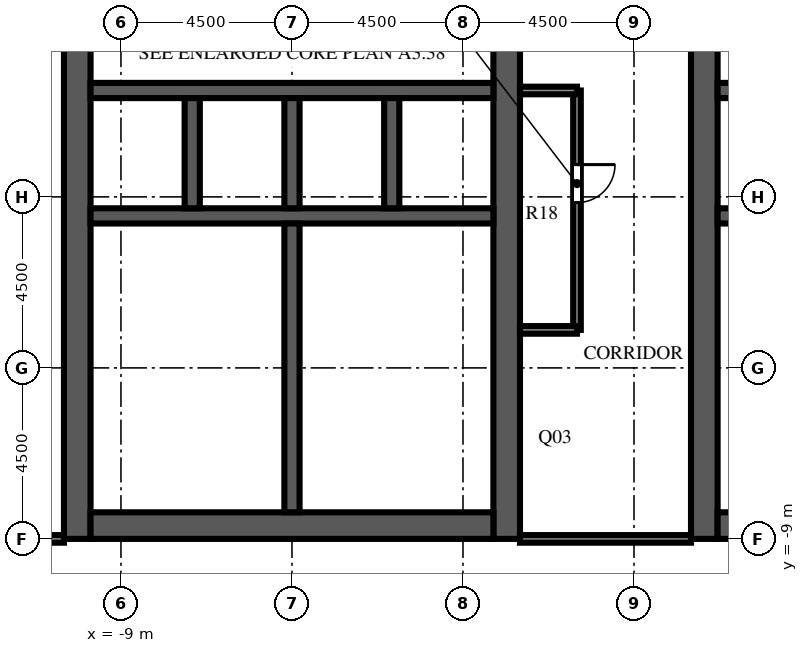
"""IFC4 building model, lengths in metres.
Left out: names, types, materials, properties, quantities, classifications, styles, units other than length and angle.
Written with IfcOpenShell. Run it as: python <this file> out.ifc"""

import sys

from ifc_helpers import new_model, si_unit, direction, frame, frame_2d, origin, place, context, subcontext, project, spatial, rectangle, extrude, element, fill, save


model = new_model("IFC4")
c1 = context("Model", 3, precision=1e-05, world=origin(), true_north=direction((0.0, 1.0)))
c2 = subcontext(c1, "Body", "Model", "MODEL_VIEW")
j1 = project(units=[si_unit("LENGTHUNIT", "METRE"), si_unit("PLANEANGLEUNIT", "RADIAN")], contexts=[c1])
p1 = place(None, origin())
s1 = spatial("IfcSite", under=j1, at=p1, CompositionType="ELEMENT")
p2 = place(p1, origin())
s2 = spatial("IfcBuilding", under=s1, at=p2, CompositionType="ELEMENT")
p3 = place(p2, frame((0.0, 0.0, 260.3)))
s3 = spatial("IfcBuildingStorey", under=s2, at=p3, CompositionType="ELEMENT", Elevation=260.3)
p4 = place(p3, frame((-10.15, -9.0, 0.0), z_axis=(0.0, 0.0, 1.0), x_axis=(0.0, 1.0, 0.0)))
e1 = element("IfcWall", 1, at=p4, inside=s3, PredefinedType="SHEAR", context=c2, shape_type="SweptSolid", body=[
    extrude(rectangle(XDim=27.5, YDim=0.7, at=frame_2d((13.75, 0.0))), origin(), (0.0, 0.0, 1.0), 6.0),
])
p5 = place(p4, frame((12.55, 0.0, 0.0)))
e2 = element("IfcOpeningElement", 2, at=p5, cuts=e1, PredefinedType="OPENING", context=c2, shape_type="SweptSolid", body=[
    extrude(rectangle(XDim=2.4, YDim=2.4, at=frame_2d((1.2, 1.2))), frame((0.0, 0.36, 0.0), z_axis=(0.0, -1.0, 0.0), x_axis=(1.0, 0.0, 0.0)), (0.0, 0.0, 1.0), 0.72),
])
p6 = place(p4, frame((6.825, 0.0, 0.0)))
e3 = element("IfcOpeningElement", 3, at=p6, cuts=e1, PredefinedType="OPENING", context=c2, shape_type="SweptSolid", body=[
    extrude(rectangle(XDim=1.2, YDim=2.1, at=frame_2d((0.6, 1.05))), frame((0.0, 0.36, 0.0), z_axis=(0.0, -1.0, 0.0), x_axis=(1.0, 0.0, 0.0)), (0.0, 0.0, 1.0), 0.72),
])
p7 = place(p4, frame((19.475, 0.0, 0.0)))
e4 = element("IfcOpeningElement", 4, at=p7, cuts=e1, PredefinedType="OPENING", context=c2, shape_type="SweptSolid", body=[
    extrude(rectangle(XDim=1.2, YDim=2.1, at=frame_2d((0.6, 1.05))), frame((0.0, 0.36, 0.0), z_axis=(0.0, -1.0, 0.0), x_axis=(1.0, 0.0, 0.0)), (0.0, 0.0, 1.0), 0.72),
])
p8 = place(p3, frame((1.15, -9.0, 0.0), z_axis=(0.0, 0.0, 1.0), x_axis=(0.0, 1.0, 0.0)))
e5 = element("IfcWall", 5, at=p8, inside=s3, PredefinedType="SHEAR", context=c2, shape_type="SweptSolid", body=[
    extrude(rectangle(XDim=27.5, YDim=0.7, at=frame_2d((13.75, 0.0))), origin(), (0.0, 0.0, 1.0), 6.0),
])
p9 = place(p8, frame((12.55, 0.0, 0.0)))
e6 = element("IfcOpeningElement", 6, at=p9, cuts=e5, PredefinedType="OPENING", context=c2, shape_type="SweptSolid", body=[
    extrude(rectangle(XDim=2.4, YDim=2.4, at=frame_2d((1.2, 1.2))), frame((0.0, 0.36, 0.0), z_axis=(0.0, -1.0, 0.0), x_axis=(1.0, 0.0, 0.0)), (0.0, 0.0, 1.0), 0.72),
])
p10 = place(p8, frame((3.788, 0.0, 0.0)))
e7 = element("IfcOpeningElement", 7, at=p10, cuts=e5, PredefinedType="OPENING", context=c2, shape_type="SweptSolid", body=[
    extrude(rectangle(XDim=0.968, YDim=2.1, at=frame_2d((0.484, 1.05))), frame((0.0, 0.36, 0.0), z_axis=(0.0, -1.0, 0.0), x_axis=(1.0, 0.0, 0.0)), (0.0, 0.0, 1.0), 0.72),
])
p11 = place(p8, frame((23.54, 0.0, 0.0)))
e8 = element("IfcOpeningElement", 8, at=p11, cuts=e5, PredefinedType="OPENING", context=c2, shape_type="SweptSolid", body=[
    extrude(rectangle(XDim=1.2, YDim=2.1, at=frame_2d((0.6, 1.05))), frame((0.0, 0.36, 0.0), z_axis=(0.0, -1.0, 0.0), x_axis=(1.0, 0.0, 0.0)), (0.0, 0.0, 1.0), 0.72),
])
p12 = place(p3, frame((-9.8, -8.65, 0.0), z_axis=(0.0, 0.0, 1.0), x_axis=(1.0, 0.0, 0.0)))
e9 = element("IfcWall", 9, at=p12, inside=s3, PredefinedType="SHEAR", context=c2, shape_type="SweptSolid", body=[
    extrude(rectangle(XDim=10.6, YDim=0.7, at=frame_2d((5.3, 0.0))), origin(), (0.0, 0.0, 1.0), 6.0),
])
p13 = place(p3, frame((-9.8, -0.5, 0.0), z_axis=(0.0, 0.0, 1.0), x_axis=(1.0, 0.0, 0.0)))
e10 = element("IfcWall", 10, at=p13, inside=s3, PredefinedType="SHEAR", context=c2, shape_type="SweptSolid", body=[
    extrude(rectangle(XDim=10.6, YDim=0.4, at=frame_2d((5.3, 0.0))), origin(), (0.0, 0.0, 1.0), 6.0),
])
p14 = place(p3, frame((-9.8, 2.8, 0.0), z_axis=(0.0, 0.0, 1.0), x_axis=(1.0, 0.0, 0.0)))
e11 = element("IfcWall", 11, at=p14, inside=s3, PredefinedType="SHEAR", context=c2, shape_type="SweptSolid", body=[
    extrude(rectangle(XDim=10.6, YDim=0.4, at=frame_2d((5.3, 0.0))), origin(), (0.0, 0.0, 1.0), 6.0),
])
p15 = place(p14, frame((0.688, 0.0, 0.0)))
e12 = element("IfcOpeningElement", 12, at=p15, cuts=e11, PredefinedType="OPENING", context=c2, shape_type="SweptSolid", body=[
    extrude(rectangle(XDim=1.1, YDim=2.1, at=frame_2d((0.55, 1.05))), frame((0.0, 0.21, 0.0), z_axis=(0.0, -1.0, 0.0), x_axis=(1.0, 0.0, 0.0)), (0.0, 0.0, 1.0), 0.42),
])
p16 = place(p14, frame((3.438, 0.0, 0.0)))
e13 = element("IfcOpeningElement", 13, at=p16, cuts=e11, PredefinedType="OPENING", context=c2, shape_type="SweptSolid", body=[
    extrude(rectangle(XDim=1.1, YDim=2.1, at=frame_2d((0.55, 1.05))), frame((0.0, 0.21, 0.0), z_axis=(0.0, -1.0, 0.0), x_axis=(1.0, 0.0, 0.0)), (0.0, 0.0, 1.0), 0.42),
])
p17 = place(p14, frame((6.113, 0.0, 0.0)))
e14 = element("IfcOpeningElement", 14, at=p17, cuts=e11, PredefinedType="OPENING", context=c2, shape_type="SweptSolid", body=[
    extrude(rectangle(XDim=1.0, YDim=2.1, at=frame_2d((0.5, 1.05))), frame((0.0, 0.21, 0.0), z_axis=(0.0, -1.0, 0.0), x_axis=(1.0, 0.0, 0.0)), (0.0, 0.0, 1.0), 0.42),
])
p18 = place(p14, frame((8.863, 0.0, 0.0)))
e15 = element("IfcOpeningElement", 15, at=p18, cuts=e11, PredefinedType="OPENING", context=c2, shape_type="SweptSolid", body=[
    extrude(rectangle(XDim=1.0, YDim=2.1, at=frame_2d((0.5, 1.05))), frame((0.0, 0.21, 0.0), z_axis=(0.0, -1.0, 0.0), x_axis=(1.0, 0.0, 0.0)), (0.0, 0.0, 1.0), 0.42),
])
for number, where, z_axis, x_axis in (
    (16, (-7.125, -0.3, 0.0), (0.0, 0.0, 1.0), (0.0, 1.0, 0.0)),
    (17, (-4.5, -0.3, 0.0), (0.0, 0.0, 1.0), (0.0, 1.0, 0.0)),
    (18, (-1.875, -0.3, 0.0), (0.0, 0.0, 1.0), (0.0, 1.0, 0.0)),
):
    element("IfcWall", number, at=place(p3, frame(where, z_axis=z_axis, x_axis=x_axis)), inside=s3, PredefinedType="SHEAR", context=c2, shape_type="SweptSolid", body=[
        extrude(rectangle(XDim=2.9, YDim=0.4, at=frame_2d((1.45, 0.0))), origin(), (0.0, 0.0, 1.0), 6.0),
    ])
p19 = place(p3, frame((-4.5, -8.3, 0.0), z_axis=(0.0, 0.0, 1.0), x_axis=(0.0, 1.0, 0.0)))
e19 = element("IfcWall", 19, at=p19, inside=s3, PredefinedType="SHEAR", context=c2, shape_type="SweptSolid", body=[
    extrude(rectangle(XDim=7.6, YDim=0.4, at=frame_2d((3.8, 0.0))), origin(), (0.0, 0.0, 1.0), 6.0),
])
p20 = place(p3, frame((6.35, -9.0, 0.0), z_axis=(0.0, 0.0, 1.0), x_axis=(0.0, 1.0, 0.0)))
e20 = element("IfcWall", 20, at=p20, inside=s3, PredefinedType="SHEAR", context=c2, shape_type="SweptSolid", body=[
    extrude(rectangle(XDim=27.5, YDim=0.7, at=frame_2d((13.75, 0.0))), origin(), (0.0, 0.0, 1.0), 6.0),
])
p21 = place(p20, frame((12.55, 0.0, 0.0)))
e21 = element("IfcOpeningElement", 21, at=p21, cuts=e20, PredefinedType="OPENING", context=c2, shape_type="SweptSolid", body=[
    extrude(rectangle(XDim=2.4, YDim=2.4, at=frame_2d((1.2, 1.2))), frame((0.0, 0.36, 0.0), z_axis=(0.0, -1.0, 0.0), x_axis=(1.0, 0.0, 0.0)), (0.0, 0.0, 1.0), 0.72),
])
p22 = place(p20, frame((3.788, 0.0, 0.0)))
e22 = element("IfcOpeningElement", 22, at=p22, cuts=e20, PredefinedType="OPENING", context=c2, shape_type="SweptSolid", body=[
    extrude(rectangle(XDim=0.968, YDim=2.1, at=frame_2d((0.484, 1.05))), frame((0.0, 0.36, 0.0), z_axis=(0.0, -1.0, 0.0), x_axis=(1.0, 0.0, 0.0)), (0.0, 0.0, 1.0), 0.72),
])
p23 = place(p20, frame((23.54, 0.0, 0.0)))
e23 = element("IfcOpeningElement", 23, at=p23, cuts=e20, PredefinedType="OPENING", context=c2, shape_type="SweptSolid", body=[
    extrude(rectangle(XDim=1.2, YDim=2.1, at=frame_2d((0.6, 1.05))), frame((0.0, 0.36, 0.0), z_axis=(0.0, -1.0, 0.0), x_axis=(1.0, 0.0, 0.0)), (0.0, 0.0, 1.0), 0.72),
])
p24 = place(p3, frame((6.7, -8.65, 0.0), z_axis=(0.0, 0.0, 1.0), x_axis=(1.0, 0.0, 0.0)))
e24 = element("IfcWall", 24, at=p24, inside=s3, PredefinedType="SHEAR", context=c2, shape_type="SweptSolid", body=[
    extrude(rectangle(XDim=10.6, YDim=0.7, at=frame_2d((5.3, 0.0))), origin(), (0.0, 0.0, 1.0), 6.0),
])
p25 = place(p3, frame((6.7, -0.5, 0.0), z_axis=(0.0, 0.0, 1.0), x_axis=(1.0, 0.0, 0.0)))
e25 = element("IfcWall", 25, at=p25, inside=s3, PredefinedType="SHEAR", context=c2, shape_type="SweptSolid", body=[
    extrude(rectangle(XDim=10.6, YDim=0.4, at=frame_2d((5.3, 0.0))), origin(), (0.0, 0.0, 1.0), 6.0),
])
p26 = place(p3, frame((6.7, 2.8, 0.0), z_axis=(0.0, 0.0, 1.0), x_axis=(1.0, 0.0, 0.0)))
e26 = element("IfcWall", 26, at=p26, inside=s3, PredefinedType="SHEAR", context=c2, shape_type="SweptSolid", body=[
    extrude(rectangle(XDim=10.6, YDim=0.4, at=frame_2d((5.3, 0.0))), origin(), (0.0, 0.0, 1.0), 6.0),
])
p27 = place(p26, frame((0.688, 0.0, 0.0)))
e27 = element("IfcOpeningElement", 27, at=p27, cuts=e26, PredefinedType="OPENING", context=c2, shape_type="SweptSolid", body=[
    extrude(rectangle(XDim=1.1, YDim=2.1, at=frame_2d((0.55, 1.05))), frame((0.0, 0.21, 0.0), z_axis=(0.0, -1.0, 0.0), x_axis=(1.0, 0.0, 0.0)), (0.0, 0.0, 1.0), 0.42),
])
p28 = place(p26, frame((3.438, 0.0, 0.0)))
e28 = element("IfcOpeningElement", 28, at=p28, cuts=e26, PredefinedType="OPENING", context=c2, shape_type="SweptSolid", body=[
    extrude(rectangle(XDim=1.1, YDim=2.1, at=frame_2d((0.55, 1.05))), frame((0.0, 0.21, 0.0), z_axis=(0.0, -1.0, 0.0), x_axis=(1.0, 0.0, 0.0)), (0.0, 0.0, 1.0), 0.42),
])
p29 = place(p26, frame((6.113, 0.0, 0.0)))
e29 = element("IfcOpeningElement", 29, at=p29, cuts=e26, PredefinedType="OPENING", context=c2, shape_type="SweptSolid", body=[
    extrude(rectangle(XDim=1.0, YDim=2.1, at=frame_2d((0.5, 1.05))), frame((0.0, 0.21, 0.0), z_axis=(0.0, -1.0, 0.0), x_axis=(1.0, 0.0, 0.0)), (0.0, 0.0, 1.0), 0.42),
])
p30 = place(p26, frame((8.863, 0.0, 0.0)))
e30 = element("IfcOpeningElement", 30, at=p30, cuts=e26, PredefinedType="OPENING", context=c2, shape_type="SweptSolid", body=[
    extrude(rectangle(XDim=1.0, YDim=2.1, at=frame_2d((0.5, 1.05))), frame((0.0, 0.21, 0.0), z_axis=(0.0, -1.0, 0.0), x_axis=(1.0, 0.0, 0.0)), (0.0, 0.0, 1.0), 0.42),
])
p31 = place(p3, frame((-4.3, -5.412, 0.0), z_axis=(0.0, 0.0, 1.0), x_axis=(1.0, 0.0, 0.0)))
e31 = element("IfcWall", 31, at=p31, inside=s3, PredefinedType="PARTITIONING", context=c2, shape_type="SweptSolid", body=[
    extrude(rectangle(XDim=5.1, YDim=0.1, at=frame_2d((2.55, 0.0))), origin(), (0.0, 0.0, 1.0), 5.55),
])
p32 = place(p31, frame((2.05, 0.0, 0.0)))
e32 = element("IfcOpeningElement", 32, at=p32, cuts=e31, PredefinedType="OPENING", context=c2, shape_type="SweptSolid", body=[
    extrude(rectangle(XDim=1.0, YDim=2.1, at=frame_2d((0.5, 1.05))), frame((0.0, 0.06, 0.0), z_axis=(0.0, -1.0, 0.0), x_axis=(1.0, 0.0, 0.0)), (0.0, 0.0, 1.0), 0.12),
])
p33 = place(p3, frame((-2.362, -4.044, 0.0), z_axis=(0.0, 0.0, 1.0), x_axis=(1.0, 0.0, 0.0)))
e33 = element("IfcWall", 33, at=p33, inside=s3, PredefinedType="PARTITIONING", context=c2, shape_type="SweptSolid", body=[
    extrude(rectangle(XDim=3.162, YDim=0.1, at=frame_2d((1.581, 0.0))), origin(), (0.0, 0.0, 1.0), 5.55),
])
p34 = place(p33, frame((1.081, 0.0, 0.0)))
e34 = element("IfcOpeningElement", 34, at=p34, cuts=e33, PredefinedType="OPENING", context=c2, shape_type="SweptSolid", body=[
    extrude(rectangle(XDim=1.0, YDim=2.1, at=frame_2d((0.5, 1.05))), frame((0.0, 0.06, 0.0), z_axis=(0.0, -1.0, 0.0), x_axis=(1.0, 0.0, 0.0)), (0.0, 0.0, 1.0), 0.12),
])
p35 = place(p3, frame((-4.3, -4.044, 0.0), z_axis=(0.0, 0.0, 1.0), x_axis=(1.0, 0.0, 0.0)))
e35 = element("IfcWall", 35, at=p35, inside=s3, PredefinedType="PARTITIONING", context=c2, shape_type="SweptSolid", body=[
    extrude(rectangle(XDim=1.938, YDim=0.1, at=frame_2d((0.969, 0.0))), origin(), (0.0, 0.0, 1.0), 5.55),
])
p36 = place(p35, frame((0.469, 0.0, 0.0)))
e36 = element("IfcOpeningElement", 36, at=p36, cuts=e35, PredefinedType="OPENING", context=c2, shape_type="SweptSolid", body=[
    extrude(rectangle(XDim=1.0, YDim=2.1, at=frame_2d((0.5, 1.05))), frame((0.0, 0.06, 0.0), z_axis=(0.0, -1.0, 0.0), x_axis=(1.0, 0.0, 0.0)), (0.0, 0.0, 1.0), 0.12),
])
p37 = place(p3, frame((-2.362, -4.044, 0.0), z_axis=(0.0, 0.0, 1.0), x_axis=(0.0, 1.0, 0.0)))
e37 = element("IfcWall", 37, at=p37, inside=s3, PredefinedType="PARTITIONING", context=c2, shape_type="SweptSolid", body=[
    extrude(rectangle(XDim=3.344, YDim=0.1, at=frame_2d((1.672, 0.0))), origin(), (0.0, 0.0, 1.0), 5.55),
])
p38 = place(p3, frame((6.7, -5.412, 0.0), z_axis=(0.0, 0.0, 1.0), x_axis=(1.0, 0.0, 0.0)))
e38 = element("IfcWall", 38, at=p38, inside=s3, PredefinedType="PARTITIONING", context=c2, shape_type="SweptSolid", body=[
    extrude(rectangle(XDim=5.1, YDim=0.1, at=frame_2d((2.55, 0.0))), origin(), (0.0, 0.0, 1.0), 5.55),
])
p39 = place(p38, frame((2.05, 0.0, 0.0)))
e39 = element("IfcOpeningElement", 39, at=p39, cuts=e38, PredefinedType="OPENING", context=c2, shape_type="SweptSolid", body=[
    extrude(rectangle(XDim=1.0, YDim=2.1, at=frame_2d((0.5, 1.05))), frame((0.0, 0.06, 0.0), z_axis=(0.0, -1.0, 0.0), x_axis=(1.0, 0.0, 0.0)), (0.0, 0.0, 1.0), 0.12),
])
p40 = place(p3, frame((6.7, -4.044, 0.0), z_axis=(0.0, 0.0, 1.0), x_axis=(1.0, 0.0, 0.0)))
e40 = element("IfcWall", 40, at=p40, inside=s3, PredefinedType="PARTITIONING", context=c2, shape_type="SweptSolid", body=[
    extrude(rectangle(XDim=3.162, YDim=0.1, at=frame_2d((1.581, 0.0))), origin(), (0.0, 0.0, 1.0), 5.55),
])
p41 = place(p40, frame((1.081, 0.0, 0.0)))
e41 = element("IfcOpeningElement", 41, at=p41, cuts=e40, PredefinedType="OPENING", context=c2, shape_type="SweptSolid", body=[
    extrude(rectangle(XDim=1.0, YDim=2.1, at=frame_2d((0.5, 1.05))), frame((0.0, 0.06, 0.0), z_axis=(0.0, -1.0, 0.0), x_axis=(1.0, 0.0, 0.0)), (0.0, 0.0, 1.0), 0.12),
])
p42 = place(p3, frame((3.0, -3.5, 0.0), z_axis=(0.0, 0.0, 1.0), x_axis=(0.0, 1.0, 0.0)))
e42 = element("IfcWall", 42, at=p42, inside=s3, PredefinedType="PARTITIONING", context=c2, shape_type="SweptSolid", body=[
    extrude(rectangle(XDim=6.3, YDim=0.2, at=frame_2d((3.15, 0.0))), origin(), (0.0, 0.0, 1.0), 5.55),
])
p43 = place(p42, frame((3.35, 0.0, 0.0)))
e43 = element("IfcOpeningElement", 43, at=p43, cuts=e42, PredefinedType="OPENING", context=c2, shape_type="SweptSolid", body=[
    extrude(rectangle(XDim=1.0, YDim=2.1, at=frame_2d((0.5, 1.05))), frame((0.0, 0.11, 0.0), z_axis=(0.0, -1.0, 0.0), x_axis=(1.0, 0.0, 0.0)), (0.0, 0.0, 1.0), 0.22),
])
p44 = place(p3, frame((-10.5, -9.0, 0.0), z_axis=(0.0, 0.0, 1.0), x_axis=(-1.0, 0.0, 0.0)))
e44 = element("IfcWall", 44, at=p44, inside=s3, PredefinedType="PARTITIONING", context=c2, shape_type="SweptSolid", body=[
    extrude(rectangle(XDim=3.0, YDim=0.2, at=frame_2d((1.5, 0.0))), origin(), (0.0, 0.0, 1.0), 3.72),
])
p45 = place(p44, frame((0.9, 0.0, 0.0)))
e45 = element("IfcOpeningElement", 45, at=p45, cuts=e44, PredefinedType="OPENING", context=c2, shape_type="SweptSolid", body=[
    extrude(rectangle(XDim=1.0, YDim=2.1, at=frame_2d((0.5, 1.05))), frame((0.0, 0.11, 0.0), z_axis=(0.0, -1.0, 0.0), x_axis=(1.0, 0.0, 0.0)), (0.0, 0.0, 1.0), 0.22),
])
p46 = place(p3, frame((1.5, -9.0, 0.0), z_axis=(0.0, 0.0, 1.0), x_axis=(1.0, 0.0, 0.0)))
e46 = element("IfcWall", 46, at=p46, inside=s3, PredefinedType="PARTITIONING", context=c2, shape_type="SweptSolid", body=[
    extrude(rectangle(XDim=4.5, YDim=0.2, at=frame_2d((2.25, 0.0))), origin(), (0.0, 0.0, 1.0), 5.55),
])
for number, where, z_axis, x_axis in (
    (47, (1.5, -3.5, 0.0), (0.0, 0.0, 1.0), (1.0, 0.0, 0.0)),
    (48, (1.5, 2.8, 0.0), (0.0, 0.0, 1.0), (1.0, 0.0, 0.0)),
):
    element("IfcWall", number, at=place(p3, frame(where, z_axis=z_axis, x_axis=x_axis)), inside=s3, PredefinedType="PARTITIONING", context=c2, shape_type="SweptSolid", body=[
        extrude(rectangle(XDim=1.5, YDim=0.2, at=frame_2d((0.75, 0.0))), origin(), (0.0, 0.0, 1.0), 5.55),
    ])
p47 = place(p15, origin())
e49 = element("IfcDoor", 49, at=p47, inside=s3, OperationType="DOUBLE_DOOR_SLIDING", PredefinedType="DOOR", context=c2, shape_type="SweptSolid", body=[
    extrude(rectangle(XDim=1.1, YDim=2.1, at=frame_2d((0.55, 1.05))), frame((0.0, 0.025, 0.0), z_axis=(0.0, -1.0, 0.0), x_axis=(1.0, 0.0, 0.0)), (0.0, 0.0, 1.0), 0.05),
])
fill(e12, e49)
p48 = place(p16, origin())
e50 = element("IfcDoor", 50, at=p48, inside=s3, OperationType="DOUBLE_DOOR_SLIDING", PredefinedType="DOOR", context=c2, shape_type="SweptSolid", body=[
    extrude(rectangle(XDim=1.1, YDim=2.1, at=frame_2d((0.55, 1.05))), frame((0.0, 0.025, 0.0), z_axis=(0.0, -1.0, 0.0), x_axis=(1.0, 0.0, 0.0)), (0.0, 0.0, 1.0), 0.05),
])
fill(e13, e50)
p49 = place(p5, origin())
e51 = element("IfcDoor", 51, at=p49, inside=s3, OperationType="DOUBLE_DOOR_DOUBLE_SWING", PredefinedType="DOOR", context=c2, shape_type="SweptSolid", body=[
    extrude(rectangle(XDim=2.4, YDim=2.4, at=frame_2d((1.2, 1.2))), frame((0.0, 0.025, 0.0), z_axis=(0.0, -1.0, 0.0), x_axis=(1.0, 0.0, 0.0)), (0.0, 0.0, 1.0), 0.05),
])
fill(e2, e51)
p50 = place(p9, origin())
e52 = element("IfcDoor", 52, at=p50, inside=s3, OperationType="DOUBLE_DOOR_DOUBLE_SWING", PredefinedType="DOOR", context=c2, shape_type="SweptSolid", body=[
    extrude(rectangle(XDim=2.4, YDim=2.4, at=frame_2d((1.2, 1.2))), frame((0.0, 0.025, 0.0), z_axis=(0.0, -1.0, 0.0), x_axis=(1.0, 0.0, 0.0)), (0.0, 0.0, 1.0), 0.05),
])
fill(e6, e52)
p51 = place(p21, origin())
e53 = element("IfcDoor", 53, at=p51, inside=s3, OperationType="DOUBLE_DOOR_DOUBLE_SWING", PredefinedType="DOOR", context=c2, shape_type="SweptSolid", body=[
    extrude(rectangle(XDim=2.4, YDim=2.4, at=frame_2d((1.2, 1.2))), frame((0.0, 0.025, 0.0), z_axis=(0.0, -1.0, 0.0), x_axis=(1.0, 0.0, 0.0)), (0.0, 0.0, 1.0), 0.05),
])
fill(e21, e53)
p52 = place(p6, origin())
e54 = element("IfcDoor", 54, at=p52, inside=s3, OperationType="SINGLE_SWING_LEFT", PredefinedType="DOOR", context=c2, shape_type="SweptSolid", body=[
    extrude(rectangle(XDim=1.2, YDim=2.1, at=frame_2d((0.6, 1.05))), frame((0.0, 0.025, 0.0), z_axis=(0.0, -1.0, 0.0), x_axis=(1.0, 0.0, 0.0)), (0.0, 0.0, 1.0), 0.05),
])
fill(e3, e54)
p53 = place(p17, origin())
e55 = element("IfcDoor", 55, at=p53, inside=s3, OperationType="SINGLE_SWING_LEFT", PredefinedType="DOOR", context=c2, shape_type="SweptSolid", body=[
    extrude(rectangle(XDim=1.0, YDim=2.1, at=frame_2d((0.5, 1.05))), frame((0.0, 0.025, 0.0), z_axis=(0.0, -1.0, 0.0), x_axis=(1.0, 0.0, 0.0)), (0.0, 0.0, 1.0), 0.05),
])
fill(e14, e55)
p54 = place(p18, origin())
e56 = element("IfcDoor", 56, at=p54, inside=s3, OperationType="SINGLE_SWING_RIGHT", PredefinedType="DOOR", context=c2, shape_type="SweptSolid", body=[
    extrude(rectangle(XDim=1.0, YDim=2.1, at=frame_2d((0.5, 1.05))), frame((0.0, 0.025, 0.0), z_axis=(0.0, -1.0, 0.0), x_axis=(1.0, 0.0, 0.0)), (0.0, 0.0, 1.0), 0.05),
])
fill(e15, e56)
p55 = place(p10, origin())
e57 = element("IfcDoor", 57, at=p55, inside=s3, OperationType="SINGLE_SWING_LEFT", PredefinedType="DOOR", context=c2, shape_type="SweptSolid", body=[
    extrude(rectangle(XDim=0.968, YDim=2.1, at=frame_2d((0.484, 1.05))), frame((0.0, 0.325, 0.0), z_axis=(0.0, -1.0, 0.0), x_axis=(1.0, 0.0, 0.0)), (0.0, 0.0, 1.0), 0.05),
])
fill(e7, e57)
p56 = place(p32, origin())
e58 = element("IfcDoor", 58, at=p56, inside=s3, OperationType="SINGLE_SWING_RIGHT", PredefinedType="DOOR", context=c2, shape_type="SweptSolid", body=[
    extrude(rectangle(XDim=1.0, YDim=2.1, at=frame_2d((0.5, 1.05))), frame((0.0, 0.025, 0.0), z_axis=(0.0, -1.0, 0.0), x_axis=(1.0, 0.0, 0.0)), (0.0, 0.0, 1.0), 0.05),
])
fill(e32, e58)
p57 = place(p34, origin())
e59 = element("IfcDoor", 59, at=p57, inside=s3, OperationType="SINGLE_SWING_LEFT", PredefinedType="DOOR", context=c2, shape_type="SweptSolid", body=[
    extrude(rectangle(XDim=1.0, YDim=2.1, at=frame_2d((0.5, 1.05))), frame((0.0, 0.025, 0.0), z_axis=(0.0, -1.0, 0.0), x_axis=(1.0, 0.0, 0.0)), (0.0, 0.0, 1.0), 0.05),
])
fill(e34, e59)
p58 = place(p36, origin())
e60 = element("IfcDoor", 60, at=p58, inside=s3, OperationType="SINGLE_SWING_RIGHT", PredefinedType="DOOR", context=c2, shape_type="SweptSolid", body=[
    extrude(rectangle(XDim=1.0, YDim=2.1, at=frame_2d((0.5, 1.05))), frame((0.0, 0.025, 0.0), z_axis=(0.0, -1.0, 0.0), x_axis=(1.0, 0.0, 0.0)), (0.0, 0.0, 1.0), 0.05),
])
fill(e36, e60)
p59 = place(p22, origin())
e61 = element("IfcDoor", 61, at=p59, inside=s3, OperationType="SINGLE_SWING_RIGHT", PredefinedType="DOOR", context=c2, shape_type="SweptSolid", body=[
    extrude(rectangle(XDim=0.968, YDim=2.1, at=frame_2d((0.484, 1.05))), frame((0.0, -0.275, 0.0), z_axis=(0.0, -1.0, 0.0), x_axis=(1.0, 0.0, 0.0)), (0.0, 0.0, 1.0), 0.05),
])
fill(e22, e61)
p60 = place(p43, origin())
e62 = element("IfcDoor", 62, at=p60, inside=s3, OperationType="SINGLE_SWING_RIGHT", PredefinedType="DOOR", context=c2, shape_type="SweptSolid", body=[
    extrude(rectangle(XDim=1.0, YDim=2.1, at=frame_2d((0.5, 1.05))), frame((0.0, 0.025, 0.0), z_axis=(0.0, -1.0, 0.0), x_axis=(1.0, 0.0, 0.0)), (0.0, 0.0, 1.0), 0.05),
])
fill(e43, e62)
save(model, sys.argv[1])
